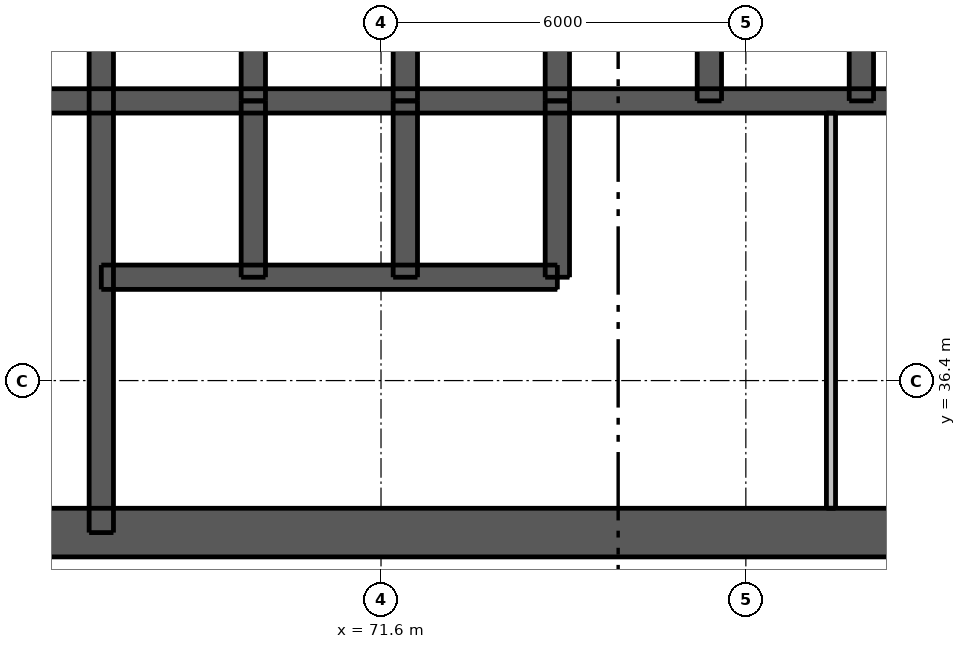
"""IFC4 building model, lengths in metres.
Left out: names, types, materials, properties, quantities, classifications, styles, units other than length and angle.
Written with IfcOpenShell. Run it as: python <this file> out.ifc"""

import sys

from ifc_helpers import new_model, si_unit, direction, frame, frame_2d, origin, place, context, subcontext, project, spatial, rectangle, extrude, element, fill, save


model = new_model("IFC4")
c1 = context("Model", 3, precision=1e-05, world=origin(), true_north=direction((0.0, 1.0)))
c2 = subcontext(c1, "Body", "Model", "MODEL_VIEW")
j1 = project(units=[si_unit("LENGTHUNIT", "METRE"), si_unit("PLANEANGLEUNIT", "RADIAN")], contexts=[c1])
p1 = place(None, origin())
s1 = spatial("IfcSite", under=j1, at=p1, CompositionType="ELEMENT")
p2 = place(p1, origin())
s2 = spatial("IfcBuilding", under=s1, at=p2, CompositionType="ELEMENT")
p3 = place(p2, frame((0.0, 0.0, 82.0)))
s3 = spatial("IfcBuildingStorey", under=s2, at=p3, CompositionType="ELEMENT", Elevation=82.0)
p4 = place(p3, frame((62.5, 33.9, 0.0), z_axis=(0.0, 0.0, 1.0), x_axis=(1.0, 0.0, 0.0)))
e1 = element("IfcWall", 1, at=p4, inside=s3, PredefinedType="SHEAR", context=c2, shape_type="SweptSolid", body=[
    extrude(rectangle(XDim=24.0, YDim=0.8, at=frame_2d((12.0, 0.0))), origin(), (0.0, 0.0, 1.0), 3.05),
])
p5 = place(p4, frame((2.0, 0.0, 0.0)))
e2 = element("IfcOpeningElement", 2, at=p5, cuts=e1, PredefinedType="OPENING", context=c2, shape_type="SweptSolid", body=[
    extrude(rectangle(XDim=1.1, YDim=2.1, at=frame_2d((0.55, 1.05))), frame((0.0, 0.41, 0.0), z_axis=(0.0, -1.0, 0.0), x_axis=(1.0, 0.0, 0.0)), (0.0, 0.0, 1.0), 0.82),
])
p6 = place(p4, frame((20.9, 0.0, 0.0)))
e3 = element("IfcOpeningElement", 3, at=p6, cuts=e1, PredefinedType="OPENING", context=c2, shape_type="SweptSolid", body=[
    extrude(rectangle(XDim=1.1, YDim=2.1, at=frame_2d((0.55, 1.05))), frame((0.0, 0.41, 0.0), z_axis=(0.0, -1.0, 0.0), x_axis=(1.0, 0.0, 0.0)), (0.0, 0.0, 1.0), 0.82),
])
p7 = place(p4, frame((8.0, 0.0, 0.0)))
e4 = element("IfcOpeningElement", 4, at=p7, cuts=e1, PredefinedType="OPENING", context=c2, shape_type="SweptSolid", body=[
    extrude(rectangle(XDim=1.1, YDim=2.1, at=frame_2d((0.55, 1.05))), frame((0.0, 0.41, 0.0), z_axis=(0.0, -1.0, 0.0), x_axis=(1.0, 0.0, 0.0)), (0.0, 0.0, 1.0), 0.82),
])
p8 = place(p4, frame((17.488, 0.0, 0.0)))
e5 = element("IfcOpeningElement", 5, at=p8, cuts=e1, PredefinedType="OPENING", context=c2, shape_type="SweptSolid", body=[
    extrude(rectangle(XDim=0.9, YDim=2.1, at=frame_2d((0.45, 1.05))), frame((0.0, 0.41, 0.0), z_axis=(0.0, -1.0, 0.0), x_axis=(1.0, 0.0, 0.0)), (0.0, 0.0, 1.0), 0.82),
])
p9 = place(p3, frame((62.9, 41.0, 0.0), z_axis=(0.0, 0.0, 1.0), x_axis=(1.0, 0.0, 0.0)))
e6 = element("IfcWall", 6, at=p9, inside=s3, PredefinedType="SHEAR", context=c2, shape_type="SweptSolid", body=[
    extrude(rectangle(XDim=23.2, YDim=0.4, at=frame_2d((11.6, 0.0))), origin(), (0.0, 0.0, 1.0), 3.05),
])
p10 = place(p3, frame((67.0, 33.9, 0.0), z_axis=(0.0, 0.0, 1.0), x_axis=(0.0, 1.0, 0.0)))
e7 = element("IfcWall", 7, at=p10, inside=s3, PredefinedType="SHEAR", context=c2, shape_type="SweptSolid", body=[
    extrude(rectangle(XDim=10.0, YDim=0.4, at=frame_2d((5.0, 0.0))), origin(), (0.0, 0.0, 1.0), 3.05),
])
p11 = place(p10, frame((0.6, 0.0, 0.0)))
e8 = element("IfcOpeningElement", 8, at=p11, cuts=e7, PredefinedType="OPENING", context=c2, shape_type="SweptSolid", body=[
    extrude(rectangle(XDim=1.1, YDim=2.1, at=frame_2d((0.55, 1.05))), frame((0.0, 0.21, 0.0), z_axis=(0.0, -1.0, 0.0), x_axis=(1.0, 0.0, 0.0)), (0.0, 0.0, 1.0), 0.42),
])
for number, where, z_axis, x_axis in (
    (9, (69.5, 41.0, 0.0), (0.0, 0.0, 1.0), (0.0, 1.0, 0.0)),
    (10, (72.0, 41.0, 0.0), (0.0, 0.0, 1.0), (0.0, 1.0, 0.0)),
    (11, (74.5, 41.0, 0.0), (0.0, 0.0, 1.0), (0.0, 1.0, 0.0)),
    (12, (77.0, 41.0, 0.0), (0.0, 0.0, 1.0), (0.0, 1.0, 0.0)),
    (13, (79.5, 41.0, 0.0), (0.0, 0.0, 1.0), (0.0, 1.0, 0.0)),
):
    element("IfcWall", number, at=place(p3, frame(where, z_axis=z_axis, x_axis=x_axis)), inside=s3, PredefinedType="SHEAR", context=c2, shape_type="SweptSolid", body=[
        extrude(rectangle(XDim=2.9, YDim=0.4, at=frame_2d((1.45, 0.0))), origin(), (0.0, 0.0, 1.0), 3.05),
    ])
p12 = place(p3, frame((67.0, 38.1, 0.0), z_axis=(0.0, 0.0, 1.0), x_axis=(1.0, 0.0, 0.0)))
e14 = element("IfcWall", 14, at=p12, inside=s3, PredefinedType="SHEAR", context=c2, shape_type="SweptSolid", body=[
    extrude(rectangle(XDim=7.5, YDim=0.4, at=frame_2d((3.75, 0.0))), origin(), (0.0, 0.0, 1.0), 3.05),
])
p13 = place(p12, frame((0.7, 0.0, 0.0)))
e15 = element("IfcOpeningElement", 15, at=p13, cuts=e14, PredefinedType="OPENING", context=c2, shape_type="SweptSolid", body=[
    extrude(rectangle(XDim=1.1, YDim=2.1, at=frame_2d((0.55, 1.05))), frame((0.0, 0.21, 0.0), z_axis=(0.0, -1.0, 0.0), x_axis=(1.0, 0.0, 0.0)), (0.0, 0.0, 1.0), 0.42),
])
p14 = place(p12, frame((3.2, 0.0, 0.0)))
e16 = element("IfcOpeningElement", 16, at=p14, cuts=e14, PredefinedType="OPENING", context=c2, shape_type="SweptSolid", body=[
    extrude(rectangle(XDim=1.1, YDim=2.1, at=frame_2d((0.55, 1.05))), frame((0.0, 0.21, 0.0), z_axis=(0.0, -1.0, 0.0), x_axis=(1.0, 0.0, 0.0)), (0.0, 0.0, 1.0), 0.42),
])
p15 = place(p12, frame((5.65, 0.0, 0.0)))
e17 = element("IfcOpeningElement", 17, at=p15, cuts=e14, PredefinedType="OPENING", context=c2, shape_type="SweptSolid", body=[
    extrude(rectangle(XDim=1.2, YDim=2.1, at=frame_2d((0.6, 1.05))), frame((0.0, 0.21, 0.0), z_axis=(0.0, -1.0, 0.0), x_axis=(1.0, 0.0, 0.0)), (0.0, 0.0, 1.0), 0.42),
])
for number, where, z_axis, x_axis in (
    (18, (69.5, 38.1, 0.0), (0.0, 0.0, 1.0), (0.0, 1.0, 0.0)),
    (19, (72.0, 38.1, 0.0), (0.0, 0.0, 1.0), (0.0, 1.0, 0.0)),
    (20, (74.5, 38.1, 0.0), (0.0, 0.0, 1.0), (0.0, 1.0, 0.0)),
):
    element("IfcWall", number, at=place(p3, frame(where, z_axis=z_axis, x_axis=x_axis)), inside=s3, PredefinedType="SHEAR", context=c2, shape_type="SweptSolid", body=[
        extrude(rectangle(XDim=2.9, YDim=0.4, at=frame_2d((1.45, 0.0))), origin(), (0.0, 0.0, 1.0), 3.05),
    ])
p16 = place(p3, frame((79.0, 34.3, 0.0), z_axis=(0.0, 0.0, 1.0), x_axis=(0.0, 1.0, 0.0)))
e21 = element("IfcWall", 21, at=p16, inside=s3, PredefinedType="PLUMBINGWALL", context=c2, shape_type="SweptSolid", body=[
    extrude(rectangle(XDim=6.5, YDim=0.15, at=frame_2d((3.25, 0.0))), origin(), (0.0, 0.0, 1.0), 3.05),
])
p17 = place(p7, origin())
e22 = element("IfcDoor", 22, at=p17, inside=s3, OperationType="SINGLE_SWING_LEFT", PredefinedType="DOOR", context=c2, shape_type="SweptSolid", body=[
    extrude(rectangle(XDim=1.1, YDim=2.1, at=frame_2d((0.55, 1.05))), frame((0.0, 0.388, 0.0), z_axis=(0.0, -1.0, 0.0), x_axis=(1.0, 0.0, 0.0)), (0.0, 0.0, 1.0), 0.05),
])
fill(e4, e22)
p18 = place(p11, origin())
e23 = element("IfcDoor", 23, at=p18, inside=s3, OperationType="SINGLE_SWING_RIGHT", PredefinedType="DOOR", context=c2, shape_type="SweptSolid", body=[
    extrude(rectangle(XDim=1.1, YDim=2.1, at=frame_2d((0.55, 1.05))), frame((0.0, -0.138, 0.0), z_axis=(0.0, -1.0, 0.0), x_axis=(1.0, 0.0, 0.0)), (0.0, 0.0, 1.0), 0.05),
])
fill(e8, e23)
p19 = place(p13, origin())
e24 = element("IfcDoor", 24, at=p19, inside=s3, OperationType="DOUBLE_DOOR_SLIDING", PredefinedType="DOOR", context=c2, shape_type="SweptSolid", body=[
    extrude(rectangle(XDim=1.1, YDim=2.1, at=frame_2d((0.55, 1.05))), frame((0.0, 0.025, 0.0), z_axis=(0.0, -1.0, 0.0), x_axis=(1.0, 0.0, 0.0)), (0.0, 0.0, 1.0), 0.05),
])
fill(e15, e24)
p20 = place(p14, origin())
e25 = element("IfcDoor", 25, at=p20, inside=s3, OperationType="DOUBLE_DOOR_SLIDING", PredefinedType="DOOR", context=c2, shape_type="SweptSolid", body=[
    extrude(rectangle(XDim=1.1, YDim=2.1, at=frame_2d((0.55, 1.05))), frame((0.0, 0.025, 0.0), z_axis=(0.0, -1.0, 0.0), x_axis=(1.0, 0.0, 0.0)), (0.0, 0.0, 1.0), 0.05),
])
fill(e16, e25)
p21 = place(p15, origin())
e26 = element("IfcDoor", 26, at=p21, inside=s3, OperationType="DOUBLE_DOOR_SLIDING", PredefinedType="DOOR", context=c2, shape_type="SweptSolid", body=[
    extrude(rectangle(XDim=1.2, YDim=2.1, at=frame_2d((0.6, 1.05))), frame((0.0, 0.025, 0.0), z_axis=(0.0, -1.0, 0.0), x_axis=(1.0, 0.0, 0.0)), (0.0, 0.0, 1.0), 0.05),
])
fill(e17, e26)
save(model, sys.argv[1])
